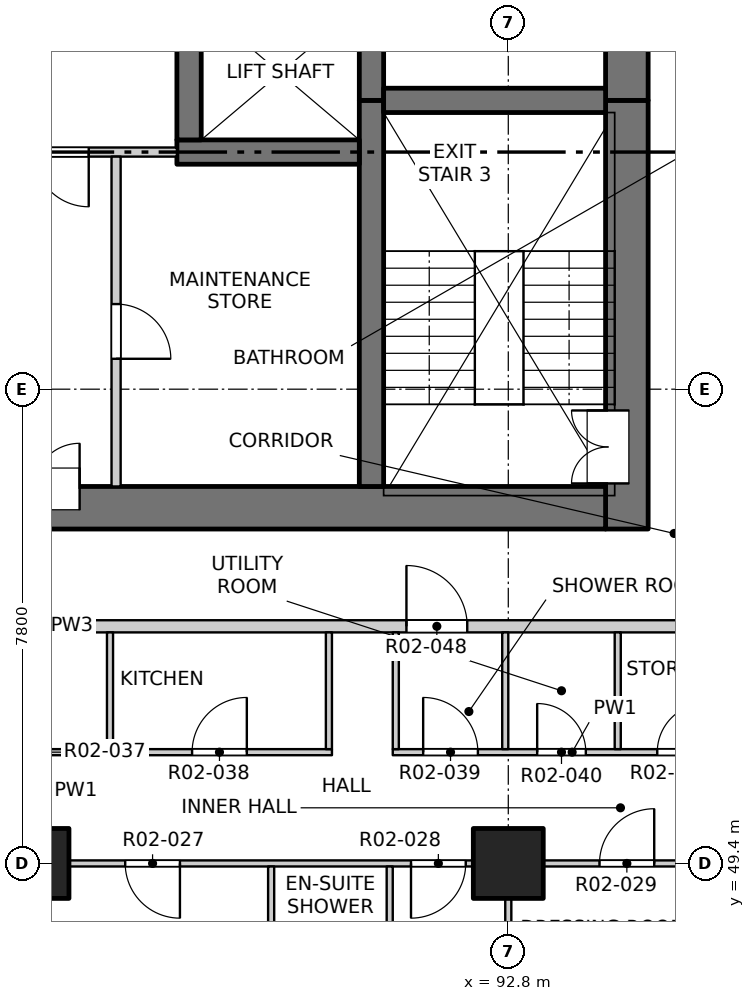
"""IFC4 building model, lengths in metres.
Left out: names, types, materials, properties, quantities, classifications, styles, units other than length and angle.
Written with IfcOpenShell. Run it as: python <this file> out.ifc"""

import sys

from ifc_helpers import new_model, si_unit, direction, frame, frame_2d, origin, origin_2d, place, context, subcontext, project, spatial, rectangle, extrude, element, fill, save


model = new_model("IFC4")
c1 = context("Model", 3, precision=1e-05, world=origin(), true_north=direction((0.0, 1.0)))
c2 = subcontext(c1, "Body", "Model", "MODEL_VIEW")
j1 = project(units=[si_unit("LENGTHUNIT", "METRE"), si_unit("PLANEANGLEUNIT", "RADIAN")], contexts=[c1])
p1 = place(None, origin())
s1 = spatial("IfcSite", under=j1, at=p1, CompositionType="ELEMENT")
p2 = place(p1, origin())
s2 = spatial("IfcBuilding", under=s1, at=p2, CompositionType="ELEMENT")
p3 = place(p2, frame((0.0, 0.0, 29.7)))
s3 = spatial("IfcBuildingStorey", under=s2, at=p3, CompositionType="ELEMENT", Elevation=29.7)
for number, where, z_axis, x_axis in (
    (1, (85.0, 49.4, -0.25), (0.0, 0.0, 1.0), (1.0, 0.0, 0.0)),
    (2, (92.8, 49.4, -0.25), (0.0, 0.0, 1.0), (1.0, 0.0, 0.0)),
):
    element("IfcColumn", number, at=place(p3, frame(where, z_axis=z_axis, x_axis=x_axis)), inside=s3, PredefinedType="COLUMN", context=c2, shape_type="SweptSolid", body=[
        extrude(rectangle(XDim=1.15, YDim=1.15, at=origin_2d()), origin(), (0.0, 0.0, 1.0), 3.4),
    ])
p4 = place(p3, frame((94.75, 54.9, -0.25), z_axis=(0.0, 0.0, 1.0), x_axis=(0.0, 1.0, 0.0)))
e3 = element("IfcWall", 3, at=p4, inside=s3, PredefinedType="SOLIDWALL", context=c2, shape_type="SweptSolid", body=[
    extrude(rectangle(XDim=7.05, YDim=0.7, at=frame_2d((3.525, 0.0))), origin(), (0.0, 0.0, 1.0), 3.4),
])
p5 = place(p4, frame((0.75, 0.0, 0.25)))
e4 = element("IfcOpeningElement", 4, at=p5, cuts=e3, PredefinedType="OPENING", context=c2, shape_type="SweptSolid", body=[
    extrude(rectangle(XDim=1.2, YDim=2.1, at=frame_2d((0.6, 1.05))), frame((0.0, 0.36, 0.0), z_axis=(0.0, -1.0, 0.0), x_axis=(1.0, 0.0, 0.0)), (0.0, 0.0, 1.0), 0.72),
])
p6 = place(p3, frame((94.75, 61.95, -0.25), z_axis=(0.0, 0.0, 1.0), x_axis=(0.0, 1.0, 0.0)))
e5 = element("IfcWall", 5, at=p6, inside=s3, PredefinedType="SOLIDWALL", context=c2, shape_type="SweptSolid", body=[
    extrude(rectangle(XDim=15.35, YDim=0.7, at=frame_2d((7.675, 0.0))), origin(), (0.0, 0.0, 1.0), 3.4),
])
p7 = place(p6, frame((0.925, 0.0, 0.25)))
e6 = element("IfcOpeningElement", 6, at=p7, cuts=e5, PredefinedType="OPENING", context=c2, shape_type="SweptSolid", body=[
    extrude(rectangle(XDim=0.9, YDim=2.1, at=frame_2d((0.45, 1.05))), frame((0.0, 0.36, 0.0), z_axis=(0.0, -1.0, 0.0), x_axis=(1.0, 0.0, 0.0)), (0.0, 0.0, 1.0), 0.72),
])
p8 = place(p6, frame((3.8, 0.0, 0.25)))
e7 = element("IfcOpeningElement", 7, at=p8, cuts=e5, PredefinedType="OPENING", context=c2, shape_type="SweptSolid", body=[
    extrude(rectangle(XDim=0.9, YDim=2.1, at=frame_2d((0.45, 1.05))), frame((0.0, 0.36, 0.0), z_axis=(0.0, -1.0, 0.0), x_axis=(1.0, 0.0, 0.0)), (0.0, 0.0, 1.0), 0.72),
])
p9 = place(p6, frame((6.8, 0.0, 0.25)))
e8 = element("IfcOpeningElement", 8, at=p9, cuts=e5, PredefinedType="OPENING", context=c2, shape_type="SweptSolid", body=[
    extrude(rectangle(XDim=0.9, YDim=2.1, at=frame_2d((0.45, 1.05))), frame((0.0, 0.36, 0.0), z_axis=(0.0, -1.0, 0.0), x_axis=(1.0, 0.0, 0.0)), (0.0, 0.0, 1.0), 0.72),
])
p10 = place(p6, frame((9.8, 0.0, 0.25)))
e9 = element("IfcOpeningElement", 9, at=p10, cuts=e5, PredefinedType="OPENING", context=c2, shape_type="SweptSolid", body=[
    extrude(rectangle(XDim=0.9, YDim=2.1, at=frame_2d((0.45, 1.05))), frame((0.0, 0.36, 0.0), z_axis=(0.0, -1.0, 0.0), x_axis=(1.0, 0.0, 0.0)), (0.0, 0.0, 1.0), 0.72),
])
p11 = place(p6, frame((13.1, 0.0, 0.25)))
e10 = element("IfcOpeningElement", 10, at=p11, cuts=e5, PredefinedType="OPENING", context=c2, shape_type="SweptSolid", body=[
    extrude(rectangle(XDim=0.9, YDim=2.1, at=frame_2d((0.45, 1.05))), frame((0.0, 0.36, 0.0), z_axis=(0.0, -1.0, 0.0), x_axis=(1.0, 0.0, 0.0)), (0.0, 0.0, 1.0), 0.72),
])
p12 = place(p3, frame((75.6, 55.25, -0.25), z_axis=(0.0, 0.0, 1.0), x_axis=(1.0, 0.0, 0.0)))
e11 = element("IfcWall", 11, at=p12, inside=s3, PredefinedType="SOLIDWALL", context=c2, shape_type="SweptSolid", body=[
    extrude(rectangle(XDim=18.8, YDim=0.7, at=frame_2d((9.4, 0.0))), origin(), (0.0, 0.0, 1.0), 3.4),
])
p13 = place(p12, frame((8.65, 0.0, 0.25)))
e12 = element("IfcOpeningElement", 12, at=p13, cuts=e11, PredefinedType="OPENING", context=c2, shape_type="SweptSolid", body=[
    extrude(rectangle(XDim=1.5, YDim=2.1, at=frame_2d((0.75, 1.05))), frame((0.0, 0.36, 0.0), z_axis=(0.0, -1.0, 0.0), x_axis=(1.0, 0.0, 0.0)), (0.0, 0.0, 1.0), 0.72),
])
p14 = place(p3, frame((90.55, 55.6, -0.25), z_axis=(0.0, 0.0, 1.0), x_axis=(0.0, 1.0, 0.0)))
e13 = element("IfcWall", 13, at=p14, inside=s3, PredefinedType="SOLIDWALL", context=c2, shape_type="SweptSolid", body=[
    extrude(rectangle(XDim=6.35, YDim=0.4, at=frame_2d((3.175, 0.0))), origin(), (0.0, 0.0, 1.0), 3.4),
])
p15 = place(p3, frame((90.55, 61.95, -0.25), z_axis=(0.0, 0.0, 1.0), x_axis=(0.0, 1.0, 0.0)))
e14 = element("IfcWall", 14, at=p15, inside=s3, PredefinedType="SOLIDWALL", context=c2, shape_type="SweptSolid", body=[
    extrude(rectangle(XDim=15.35, YDim=0.4, at=frame_2d((7.675, 0.0))), origin(), (0.0, 0.0, 1.0), 3.4),
])
p16 = place(p3, frame((87.35, 61.1, -0.25), z_axis=(0.0, 0.0, 1.0), x_axis=(1.0, 0.0, 0.0)))
e15 = element("IfcWall", 15, at=p16, inside=s3, PredefinedType="SOLIDWALL", context=c2, shape_type="SweptSolid", body=[
    extrude(rectangle(XDim=3.0, YDim=0.4, at=frame_2d((1.5, 0.0))), origin(), (0.0, 0.0, 1.0), 3.4),
])
p17 = place(p3, frame((87.55, 61.3, -0.25), z_axis=(0.0, 0.0, 1.0), x_axis=(0.0, 1.0, 0.0)))
e16 = element("IfcWall", 16, at=p17, inside=s3, PredefinedType="SOLIDWALL", context=c2, shape_type="SweptSolid", body=[
    extrude(rectangle(XDim=2.2, YDim=0.4, at=frame_2d((1.1, 0.0))), origin(), (0.0, 0.0, 1.0), 3.4),
])
p18 = place(p3, frame((90.75, 61.95, -0.25), z_axis=(0.0, 0.0, 1.0), x_axis=(1.0, 0.0, 0.0)))
e17 = element("IfcWall", 17, at=p18, inside=s3, PredefinedType="SOLIDWALL", context=c2, shape_type="SweptSolid", body=[
    extrude(rectangle(XDim=3.65, YDim=0.4, at=frame_2d((1.825, 0.0))), origin(), (0.0, 0.0, 1.0), 3.4),
])
p19 = place(p3, frame((73.2, 49.4, 0.0), z_axis=(0.0, 0.0, 1.0), x_axis=(1.0, 0.0, 0.0)))
e18 = element("IfcWall", 18, at=p19, inside=s3, PredefinedType="PARTITIONING", context=c2, shape_type="SweptSolid", body=[
    extrude(rectangle(XDim=23.6, YDim=0.1, at=frame_2d((11.8, 0.0))), origin(), (0.0, 0.0, 1.0), 3.15),
])
p20 = place(p19, frame((1.6, 0.0, 0.0)))
e19 = element("IfcOpeningElement", 19, at=p20, cuts=e18, PredefinedType="OPENING", context=c2, shape_type="SweptSolid", body=[
    extrude(rectangle(XDim=0.9, YDim=2.1, at=frame_2d((0.45, 1.05))), frame((0.0, 0.06, 0.0), z_axis=(0.0, -1.0, 0.0), x_axis=(1.0, 0.0, 0.0)), (0.0, 0.0, 1.0), 0.12),
])
p21 = place(p19, frame((6.475, 0.0, 0.0)))
e20 = element("IfcOpeningElement", 20, at=p21, cuts=e18, PredefinedType="OPENING", context=c2, shape_type="SweptSolid", body=[
    extrude(rectangle(XDim=0.9, YDim=2.1, at=frame_2d((0.45, 1.05))), frame((0.0, 0.06, 0.0), z_axis=(0.0, -1.0, 0.0), x_axis=(1.0, 0.0, 0.0)), (0.0, 0.0, 1.0), 0.12),
])
p22 = place(p19, frame((10.2, 0.0, 0.0)))
e21 = element("IfcOpeningElement", 21, at=p22, cuts=e18, PredefinedType="OPENING", context=c2, shape_type="SweptSolid", body=[
    extrude(rectangle(XDim=0.9, YDim=2.1, at=frame_2d((0.45, 1.05))), frame((0.0, 0.06, 0.0), z_axis=(0.0, -1.0, 0.0), x_axis=(1.0, 0.0, 0.0)), (0.0, 0.0, 1.0), 0.12),
])
p23 = place(p19, frame((13.3, 0.0, 0.0)))
e22 = element("IfcOpeningElement", 22, at=p23, cuts=e18, PredefinedType="OPENING", context=c2, shape_type="SweptSolid", body=[
    extrude(rectangle(XDim=0.9, YDim=2.1, at=frame_2d((0.45, 1.05))), frame((0.0, 0.06, 0.0), z_axis=(0.0, -1.0, 0.0), x_axis=(1.0, 0.0, 0.0)), (0.0, 0.0, 1.0), 0.12),
])
p24 = place(p19, frame((18.0, 0.0, 0.0)))
e23 = element("IfcOpeningElement", 23, at=p24, cuts=e18, PredefinedType="OPENING", context=c2, shape_type="SweptSolid", body=[
    extrude(rectangle(XDim=0.9, YDim=2.1, at=frame_2d((0.45, 1.05))), frame((0.0, 0.06, 0.0), z_axis=(0.0, -1.0, 0.0), x_axis=(1.0, 0.0, 0.0)), (0.0, 0.0, 1.0), 0.12),
])
p25 = place(p19, frame((21.1, 0.0, 0.0)))
e24 = element("IfcOpeningElement", 24, at=p25, cuts=e18, PredefinedType="OPENING", context=c2, shape_type="SweptSolid", body=[
    extrude(rectangle(XDim=0.9, YDim=2.1, at=frame_2d((0.45, 1.05))), frame((0.0, 0.06, 0.0), z_axis=(0.0, -1.0, 0.0), x_axis=(1.0, 0.0, 0.0)), (0.0, 0.0, 1.0), 0.12),
])
p26 = place(p3, frame((78.9, 51.23, 0.0), z_axis=(0.0, 0.0, 1.0), x_axis=(1.0, 0.0, 0.0)))
e25 = element("IfcWall", 25, at=p26, inside=s3, PredefinedType="PARTITIONING", context=c2, shape_type="SweptSolid", body=[
    extrude(rectangle(XDim=11.0, YDim=0.1, at=frame_2d((5.5, 0.0))), origin(), (0.0, 0.0, 1.0), 3.15),
])
p27 = place(p26, frame((0.725, 0.0, 0.0)))
e26 = element("IfcOpeningElement", 26, at=p27, cuts=e25, PredefinedType="OPENING", context=c2, shape_type="SweptSolid", body=[
    extrude(rectangle(XDim=0.8, YDim=2.1, at=frame_2d((0.4, 1.05))), frame((0.0, 0.06, 0.0), z_axis=(0.0, -1.0, 0.0), x_axis=(1.0, 0.0, 0.0)), (0.0, 0.0, 1.0), 0.12),
])
p28 = place(p26, frame((2.95, 0.0, 0.0)))
e27 = element("IfcOpeningElement", 27, at=p28, cuts=e25, PredefinedType="OPENING", context=c2, shape_type="SweptSolid", body=[
    extrude(rectangle(XDim=0.9, YDim=2.1, at=frame_2d((0.45, 1.05))), frame((0.0, 0.06, 0.0), z_axis=(0.0, -1.0, 0.0), x_axis=(1.0, 0.0, 0.0)), (0.0, 0.0, 1.0), 0.12),
])
p29 = place(p26, frame((5.575, 0.0, 0.0)))
e28 = element("IfcOpeningElement", 28, at=p29, cuts=e25, PredefinedType="OPENING", context=c2, shape_type="SweptSolid", body=[
    extrude(rectangle(XDim=0.8, YDim=2.1, at=frame_2d((0.4, 1.05))), frame((0.0, 0.06, 0.0), z_axis=(0.0, -1.0, 0.0), x_axis=(1.0, 0.0, 0.0)), (0.0, 0.0, 1.0), 0.12),
])
p30 = place(p26, frame((8.7, 0.0, 0.0)))
e29 = element("IfcOpeningElement", 29, at=p30, cuts=e25, PredefinedType="OPENING", context=c2, shape_type="SweptSolid", body=[
    extrude(rectangle(XDim=0.9, YDim=2.1, at=frame_2d((0.45, 1.05))), frame((0.0, 0.06, 0.0), z_axis=(0.0, -1.0, 0.0), x_axis=(1.0, 0.0, 0.0)), (0.0, 0.0, 1.0), 0.12),
])
p31 = place(p3, frame((90.9, 51.23, 0.0), z_axis=(0.0, 0.0, 1.0), x_axis=(1.0, 0.0, 0.0)))
e30 = element("IfcWall", 30, at=p31, inside=s3, PredefinedType="PARTITIONING", context=c2, shape_type="SweptSolid", body=[
    extrude(rectangle(XDim=5.9, YDim=0.1, at=frame_2d((2.95, 0.0))), origin(), (0.0, 0.0, 1.0), 3.15),
])
p32 = place(p31, frame((0.5, 0.0, 0.0)))
e31 = element("IfcOpeningElement", 31, at=p32, cuts=e30, PredefinedType="OPENING", context=c2, shape_type="SweptSolid", body=[
    extrude(rectangle(XDim=0.9, YDim=2.1, at=frame_2d((0.45, 1.05))), frame((0.0, 0.06, 0.0), z_axis=(0.0, -1.0, 0.0), x_axis=(1.0, 0.0, 0.0)), (0.0, 0.0, 1.0), 0.12),
])
p33 = place(p31, frame((2.375, 0.0, 0.0)))
e32 = element("IfcOpeningElement", 32, at=p33, cuts=e30, PredefinedType="OPENING", context=c2, shape_type="SweptSolid", body=[
    extrude(rectangle(XDim=0.8, YDim=2.1, at=frame_2d((0.4, 1.05))), frame((0.0, 0.06, 0.0), z_axis=(0.0, -1.0, 0.0), x_axis=(1.0, 0.0, 0.0)), (0.0, 0.0, 1.0), 0.12),
])
p34 = place(p31, frame((4.35, 0.0, 0.0)))
e33 = element("IfcOpeningElement", 33, at=p34, cuts=e30, PredefinedType="OPENING", context=c2, shape_type="SweptSolid", body=[
    extrude(rectangle(XDim=0.8, YDim=2.1, at=frame_2d((0.4, 1.05))), frame((0.0, 0.06, 0.0), z_axis=(0.0, -1.0, 0.0), x_axis=(1.0, 0.0, 0.0)), (0.0, 0.0, 1.0), 0.12),
])
p35 = place(p3, frame((73.2, 53.3, 0.0), z_axis=(0.0, 0.0, 1.0), x_axis=(1.0, 0.0, 0.0)))
e34 = element("IfcWall", 34, at=p35, inside=s3, PredefinedType="PARTITIONING", context=c2, shape_type="SweptSolid", body=[
    extrude(rectangle(XDim=23.6, YDim=0.2, at=frame_2d((11.8, 0.0))), origin(), (0.0, 0.0, 1.0), 3.15),
])
p36 = place(p35, frame((5.925, 0.0, 0.0)))
e35 = element("IfcOpeningElement", 35, at=p36, cuts=e34, PredefinedType="OPENING", context=c2, shape_type="SweptSolid", body=[
    extrude(rectangle(XDim=1.0, YDim=2.1, at=frame_2d((0.5, 1.05))), frame((0.0, 0.11, 0.0), z_axis=(0.0, -1.0, 0.0), x_axis=(1.0, 0.0, 0.0)), (0.0, 0.0, 1.0), 0.22),
])
p37 = place(p35, frame((17.925, 0.0, 0.0)))
e36 = element("IfcOpeningElement", 36, at=p37, cuts=e34, PredefinedType="OPENING", context=c2, shape_type="SweptSolid", body=[
    extrude(rectangle(XDim=1.0, YDim=2.1, at=frame_2d((0.5, 1.05))), frame((0.0, 0.11, 0.0), z_axis=(0.0, -1.0, 0.0), x_axis=(1.0, 0.0, 0.0)), (0.0, 0.0, 1.0), 0.22),
])
p38 = place(p3, frame((82.65, 61.1, 0.0), z_axis=(0.0, 0.0, 1.0), x_axis=(1.0, 0.0, 0.0)))
e37 = element("IfcWall", 37, at=p38, inside=s3, PredefinedType="PARTITIONING", context=c2, shape_type="SweptSolid", body=[
    extrude(rectangle(XDim=4.7, YDim=0.15, at=frame_2d((2.35, 0.0))), origin(), (0.0, 0.0, 1.0), 3.15),
])
p39 = place(p38, frame((1.45, 0.0, 0.0)))
e38 = element("IfcOpeningElement", 38, at=p39, cuts=e37, PredefinedType="OPENING", context=c2, shape_type="SweptSolid", body=[
    extrude(rectangle(XDim=1.8, YDim=2.1, at=frame_2d((0.9, 1.05))), frame((0.0, 0.085, 0.0), z_axis=(0.0, -1.0, 0.0), x_axis=(1.0, 0.0, 0.0)), (0.0, 0.0, 1.0), 0.17),
])
p40 = place(p3, frame((86.25, 51.28, 0.0), z_axis=(0.0, 0.0, 1.0), x_axis=(0.0, 1.0, 0.0)))
e39 = element("IfcWall", 39, at=p40, inside=s3, PredefinedType="PARTITIONING", context=c2, shape_type="SweptSolid", body=[
    extrude(rectangle(XDim=1.92, YDim=0.1, at=frame_2d((0.96, 0.0))), origin(), (0.0, 0.0, 1.0), 3.15),
])
p41 = place(p3, frame((86.35, 55.6, 0.0), z_axis=(0.0, 0.0, 1.0), x_axis=(0.0, 1.0, 0.0)))
e40 = element("IfcWall", 40, at=p41, inside=s3, PredefinedType="PARTITIONING", context=c2, shape_type="SweptSolid", body=[
    extrude(rectangle(XDim=5.425, YDim=0.15, at=frame_2d((2.712, 0.0))), origin(), (0.0, 0.0, 1.0), 3.15),
])
p42 = place(p41, frame((2.1, 0.0, 0.0)))
e41 = element("IfcOpeningElement", 41, at=p42, cuts=e40, PredefinedType="OPENING", context=c2, shape_type="SweptSolid", body=[
    extrude(rectangle(XDim=0.9, YDim=2.1, at=frame_2d((0.45, 1.05))), frame((0.0, 0.085, 0.0), z_axis=(0.0, -1.0, 0.0), x_axis=(1.0, 0.0, 0.0)), (0.0, 0.0, 1.0), 0.17),
])
p43 = place(p3, frame((88.9, 41.9, 0.0), z_axis=(0.0, 0.0, 1.0), x_axis=(0.0, 1.0, 0.0)))
e42 = element("IfcWall", 42, at=p43, inside=s3, PredefinedType="PARTITIONING", context=c2, shape_type="SweptSolid", body=[
    extrude(rectangle(XDim=7.45, YDim=0.1, at=frame_2d((3.725, 0.0))), origin(), (0.0, 0.0, 1.0), 3.15),
])
p44 = place(p3, frame((89.85, 51.28, 0.0), z_axis=(0.0, 0.0, 1.0), x_axis=(0.0, 1.0, 0.0)))
e43 = element("IfcWall", 43, at=p44, inside=s3, PredefinedType="PARTITIONING", context=c2, shape_type="SweptSolid", body=[
    extrude(rectangle(XDim=1.92, YDim=0.1, at=frame_2d((0.96, 0.0))), origin(), (0.0, 0.0, 1.0), 3.15),
])
p45 = place(p3, frame((90.85, 46.0, 0.0), z_axis=(0.0, 0.0, 1.0), x_axis=(0.0, 1.0, 0.0)))
e44 = element("IfcWall", 44, at=p45, inside=s3, PredefinedType="PARTITIONING", context=c2, shape_type="SweptSolid", body=[
    extrude(rectangle(XDim=3.35, YDim=0.1, at=frame_2d((1.675, 0.0))), origin(), (0.0, 0.0, 1.0), 3.15),
])
for number, where, z_axis, x_axis in (
    (45, (90.95, 51.28, 0.0), (0.0, 0.0, 1.0), (0.0, 1.0, 0.0)),
    (46, (92.75, 51.28, 0.0), (0.0, 0.0, 1.0), (0.0, 1.0, 0.0)),
):
    element("IfcWall", number, at=place(p3, frame(where, z_axis=z_axis, x_axis=x_axis)), inside=s3, PredefinedType="PARTITIONING", context=c2, shape_type="SweptSolid", body=[
        extrude(rectangle(XDim=1.92, YDim=0.1, at=frame_2d((0.96, 0.0))), origin(), (0.0, 0.0, 1.0), 3.15),
    ])
p46 = place(p3, frame((92.8, 41.9, 0.0), z_axis=(0.0, 0.0, 1.0), x_axis=(0.0, 1.0, 0.0)))
e47 = element("IfcWall", 47, at=p46, inside=s3, PredefinedType="PARTITIONING", context=c2, shape_type="SweptSolid", body=[
    extrude(rectangle(XDim=7.45, YDim=0.1, at=frame_2d((3.725, 0.0))), origin(), (0.0, 0.0, 1.0), 2.55),
])
p47 = place(p3, frame((94.6, 51.28, 0.0), z_axis=(0.0, 0.0, 1.0), x_axis=(0.0, 1.0, 0.0)))
e48 = element("IfcWall", 48, at=p47, inside=s3, PredefinedType="PARTITIONING", context=c2, shape_type="SweptSolid", body=[
    extrude(rectangle(XDim=1.92, YDim=0.1, at=frame_2d((0.96, 0.0))), origin(), (0.0, 0.0, 1.0), 3.15),
])
p48 = place(p23, origin())
e49 = element("IfcDoor", 49, at=p48, inside=s3, OperationType="SINGLE_SWING_LEFT", PredefinedType="DOOR", context=c2, shape_type="SweptSolid", body=[
    extrude(rectangle(XDim=0.9, YDim=2.1, at=frame_2d((0.45, 1.05))), frame((0.0, 0.025, 0.0), z_axis=(0.0, -1.0, 0.0), x_axis=(1.0, 0.0, 0.0)), (0.0, 0.0, 1.0), 0.05),
])
fill(e22, e49)
p49 = place(p24, origin())
e50 = element("IfcDoor", 50, at=p49, inside=s3, OperationType="SINGLE_SWING_RIGHT", PredefinedType="DOOR", context=c2, shape_type="SweptSolid", body=[
    extrude(rectangle(XDim=0.9, YDim=2.1, at=frame_2d((0.45, 1.05))), frame((0.0, 0.025, 0.0), z_axis=(0.0, -1.0, 0.0), x_axis=(1.0, 0.0, 0.0)), (0.0, 0.0, 1.0), 0.05),
])
fill(e23, e50)
p50 = place(p25, origin())
e51 = element("IfcDoor", 51, at=p50, inside=s3, OperationType="SINGLE_SWING_RIGHT", PredefinedType="DOOR", context=c2, shape_type="SweptSolid", body=[
    extrude(rectangle(XDim=0.9, YDim=2.1, at=frame_2d((0.45, 1.05))), frame((0.0, 0.025, 0.0), z_axis=(0.0, -1.0, 0.0), x_axis=(1.0, 0.0, 0.0)), (0.0, 0.0, 1.0), 0.05),
])
fill(e24, e51)
p51 = place(p30, origin())
e52 = element("IfcDoor", 52, at=p51, inside=s3, OperationType="SINGLE_SWING_RIGHT", PredefinedType="DOOR", context=c2, shape_type="SweptSolid", body=[
    extrude(rectangle(XDim=0.9, YDim=2.1, at=frame_2d((0.45, 1.05))), frame((0.0, 0.025, 0.0), z_axis=(0.0, -1.0, 0.0), x_axis=(1.0, 0.0, 0.0)), (0.0, 0.0, 1.0), 0.05),
])
fill(e29, e52)
p52 = place(p32, origin())
e53 = element("IfcDoor", 53, at=p52, inside=s3, OperationType="SINGLE_SWING_LEFT", PredefinedType="DOOR", context=c2, shape_type="SweptSolid", body=[
    extrude(rectangle(XDim=0.9, YDim=2.1, at=frame_2d((0.45, 1.05))), frame((0.0, 0.025, 0.0), z_axis=(0.0, -1.0, 0.0), x_axis=(1.0, 0.0, 0.0)), (0.0, 0.0, 1.0), 0.05),
])
fill(e31, e53)
p53 = place(p33, origin())
e54 = element("IfcDoor", 54, at=p53, inside=s3, OperationType="SINGLE_SWING_LEFT", PredefinedType="DOOR", context=c2, shape_type="SweptSolid", body=[
    extrude(rectangle(XDim=0.8, YDim=2.1, at=frame_2d((0.4, 1.05))), frame((0.0, 0.025, 0.0), z_axis=(0.0, -1.0, 0.0), x_axis=(1.0, 0.0, 0.0)), (0.0, 0.0, 1.0), 0.05),
])
fill(e32, e54)
p54 = place(p34, origin())
e55 = element("IfcDoor", 55, at=p54, inside=s3, OperationType="SINGLE_SWING_RIGHT", PredefinedType="DOOR", context=c2, shape_type="SweptSolid", body=[
    extrude(rectangle(XDim=0.8, YDim=2.1, at=frame_2d((0.4, 1.05))), frame((0.0, 0.025, 0.0), z_axis=(0.0, -1.0, 0.0), x_axis=(1.0, 0.0, 0.0)), (0.0, 0.0, 1.0), 0.05),
])
fill(e33, e55)
p55 = place(p37, origin())
e56 = element("IfcDoor", 56, at=p55, inside=s3, OperationType="SINGLE_SWING_LEFT", PredefinedType="DOOR", context=c2, shape_type="SweptSolid", body=[
    extrude(rectangle(XDim=1.0, YDim=2.1, at=frame_2d((0.5, 1.05))), frame((0.0, 0.025, 0.0), z_axis=(0.0, -1.0, 0.0), x_axis=(1.0, 0.0, 0.0)), (0.0, 0.0, 1.0), 0.05),
])
fill(e36, e56)
p56 = place(p13, origin())
e57 = element("IfcDoor", 57, at=p56, inside=s3, OperationType="DOUBLE_DOOR_SINGLE_SWING", PredefinedType="DOOR", context=c2, shape_type="SweptSolid", body=[
    extrude(rectangle(XDim=1.5, YDim=2.1, at=frame_2d((0.75, 1.05))), frame((0.0, 0.335, 0.0), z_axis=(0.0, -1.0, 0.0), x_axis=(1.0, 0.0, 0.0)), (0.0, 0.0, 1.0), 0.05),
])
fill(e12, e57)
p57 = place(p5, origin())
e58 = element("IfcDoor", 58, at=p57, inside=s3, OperationType="DOUBLE_DOOR_SINGLE_SWING", PredefinedType="DOOR", context=c2, shape_type="SweptSolid", body=[
    extrude(rectangle(XDim=1.2, YDim=2.1, at=frame_2d((0.6, 1.05))), frame((0.0, 0.335, 0.0), z_axis=(0.0, -1.0, 0.0), x_axis=(1.0, 0.0, 0.0)), (0.0, 0.0, 1.0), 0.05),
])
fill(e4, e58)
p58 = place(p42, origin())
e59 = element("IfcDoor", 59, at=p58, inside=s3, OperationType="SINGLE_SWING_RIGHT", PredefinedType="DOOR", context=c2, shape_type="SweptSolid", body=[
    extrude(rectangle(XDim=0.9, YDim=2.1, at=frame_2d((0.45, 1.05))), frame((0.0, 0.025, 0.0), z_axis=(0.0, -1.0, 0.0), x_axis=(1.0, 0.0, 0.0)), (0.0, 0.0, 1.0), 0.05),
])
fill(e41, e59)
p59 = place(p39, origin())
e60 = element("IfcDoor", 60, at=p59, inside=s3, OperationType="DOUBLE_DOOR_SINGLE_SWING", PredefinedType="DOOR", context=c2, shape_type="SweptSolid", body=[
    extrude(rectangle(XDim=1.8, YDim=2.1, at=frame_2d((0.9, 1.05))), frame((0.0, 0.025, 0.0), z_axis=(0.0, -1.0, 0.0), x_axis=(1.0, 0.0, 0.0)), (0.0, 0.0, 1.0), 0.05),
])
fill(e38, e60)
save(model, sys.argv[1])
